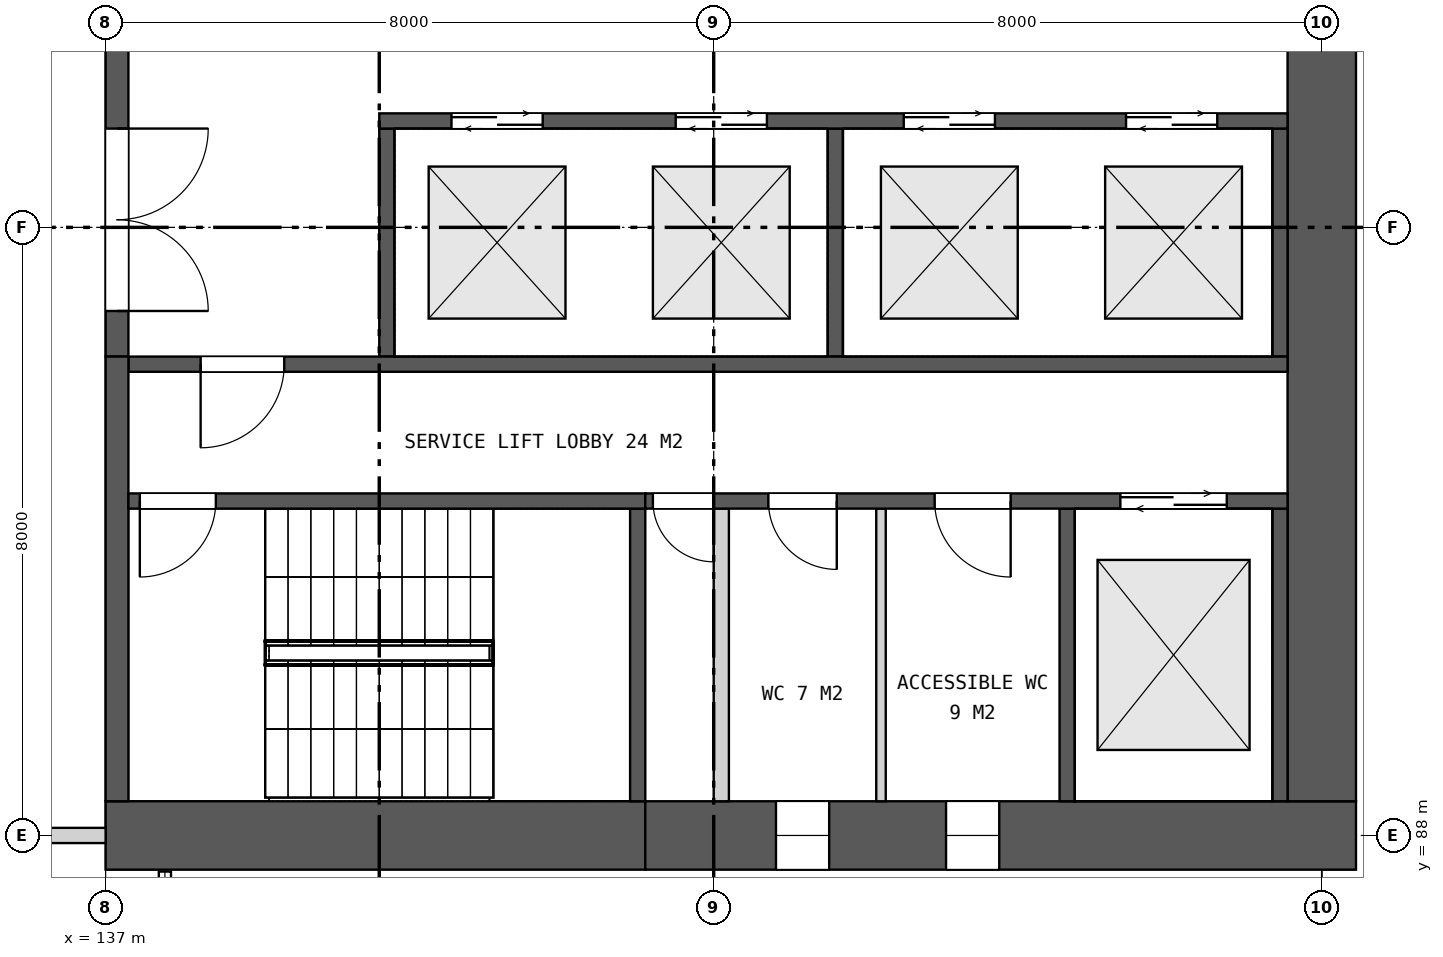
"""IFC4 building model, lengths in metres.
Left out: names, types, materials, properties, quantities, classifications, styles, units other than length and angle.
Written with IfcOpenShell. Run it as: python <this file> out.ifc"""

import sys

from ifc_helpers import new_model, si_unit, direction, frame, frame_2d, origin, place, context, subcontext, project, spatial, rectangle, extrude, element, fill, save


model = new_model("IFC4")
c1 = context("Model", 3, precision=1e-05, world=origin(), true_north=direction((0.0, 1.0)))
c2 = subcontext(c1, "Body", "Model", "MODEL_VIEW")
j1 = project(units=[si_unit("LENGTHUNIT", "METRE"), si_unit("PLANEANGLEUNIT", "RADIAN")], contexts=[c1])
p1 = place(None, origin())
s1 = spatial("IfcSite", under=j1, at=p1, CompositionType="ELEMENT")
p2 = place(p1, origin())
s2 = spatial("IfcBuilding", under=s1, at=p2, CompositionType="ELEMENT")
p3 = place(p2, frame((0.0, 0.0, 34.0)))
s3 = spatial("IfcBuildingStorey", under=s2, at=p3, CompositionType="ELEMENT", Elevation=34.0)
p4 = place(p3, frame((137.0, 88.0, 0.0), z_axis=(0.0, 0.0, 1.0), x_axis=(1.0, 0.0, 0.0)))
e1 = element("IfcWall", 1, at=p4, inside=s3, PredefinedType="SHEAR", context=c2, shape_type="SweptSolid", body=[
    extrude(rectangle(XDim=7.1, YDim=0.9, at=frame_2d((3.55, 0.0))), origin(), (0.0, 0.0, 1.0), 7.5),
])
p5 = place(p3, frame((144.1, 88.0, 0.0), z_axis=(0.0, 0.0, 1.0), x_axis=(1.0, 0.0, 0.0)))
e2 = element("IfcWall", 2, at=p5, inside=s3, PredefinedType="SHEAR", context=c2, shape_type="SweptSolid", body=[
    extrude(rectangle(XDim=9.35, YDim=0.9, at=frame_2d((4.675, 0.0))), origin(), (0.0, 0.0, 1.0), 7.5),
])
p6 = place(p5, frame((1.719, 0.0, 1.5)))
e3 = element("IfcOpeningElement", 3, at=p6, cuts=e2, PredefinedType="OPENING", context=c2, shape_type="SweptSolid", body=[
    extrude(rectangle(XDim=0.7, YDim=0.9, at=frame_2d((0.35, 0.45))), frame((0.0, 0.46, 0.0), z_axis=(0.0, -1.0, 0.0), x_axis=(1.0, 0.0, 0.0)), (0.0, 0.0, 1.0), 0.92),
])
p7 = place(p5, frame((3.957, 0.0, 1.5)))
e4 = element("IfcOpeningElement", 4, at=p7, cuts=e2, PredefinedType="OPENING", context=c2, shape_type="SweptSolid", body=[
    extrude(rectangle(XDim=0.7, YDim=0.9, at=frame_2d((0.35, 0.45))), frame((0.0, 0.46, 0.0), z_axis=(0.0, -1.0, 0.0), x_axis=(1.0, 0.0, 0.0)), (0.0, 0.0, 1.0), 0.92),
])
p8 = place(p3, frame((153.0, 88.45, 0.0), z_axis=(0.0, 0.0, 1.0), x_axis=(0.0, 1.0, 0.0)))
e5 = element("IfcWall", 5, at=p8, inside=s3, PredefinedType="SHEAR", context=c2, shape_type="SweptSolid", body=[
    extrude(rectangle(XDim=23.1, YDim=0.9, at=frame_2d((11.55, 0.0))), origin(), (0.0, 0.0, 1.0), 7.5),
])
p9 = place(p8, frame((10.35, 0.0, 0.0)))
e6 = element("IfcOpeningElement", 6, at=p9, cuts=e5, PredefinedType="OPENING", context=c2, shape_type="SweptSolid", body=[
    extrude(rectangle(XDim=2.4, YDim=2.4, at=frame_2d((1.2, 1.2))), frame((0.0, 0.46, 0.0), z_axis=(0.0, -1.0, 0.0), x_axis=(1.0, 0.0, 0.0)), (0.0, 0.0, 1.0), 0.92),
])
p10 = place(p3, frame((137.15, 94.3, 0.0), z_axis=(0.0, 0.0, 1.0), x_axis=(0.0, 1.0, 0.0)))
e7 = element("IfcWall", 7, at=p10, inside=s3, PredefinedType="SHEAR", context=c2, shape_type="SweptSolid", body=[
    extrude(rectangle(XDim=11.4, YDim=0.3, at=frame_2d((5.7, 0.0))), origin(), (0.0, 0.0, 1.0), 7.5),
])
p11 = place(p10, frame((0.6, 0.0, 0.0)))
e8 = element("IfcOpeningElement", 8, at=p11, cuts=e7, PredefinedType="OPENING", context=c2, shape_type="SweptSolid", body=[
    extrude(rectangle(XDim=2.4, YDim=2.4, at=frame_2d((1.2, 1.2))), frame((0.0, 0.16, 0.0), z_axis=(0.0, -1.0, 0.0), x_axis=(1.0, 0.0, 0.0)), (0.0, 0.0, 1.0), 0.32),
])
p12 = place(p10, frame((4.5, 0.0, 0.0)))
e9 = element("IfcOpeningElement", 9, at=p12, cuts=e7, PredefinedType="OPENING", context=c2, shape_type="SweptSolid", body=[
    extrude(rectangle(XDim=2.4, YDim=2.4, at=frame_2d((1.2, 1.2))), frame((0.0, 0.16, 0.0), z_axis=(0.0, -1.0, 0.0), x_axis=(1.0, 0.0, 0.0)), (0.0, 0.0, 1.0), 0.32),
])
p13 = place(p10, frame((8.4, 0.0, 0.0)))
e10 = element("IfcOpeningElement", 10, at=p13, cuts=e7, PredefinedType="OPENING", context=c2, shape_type="SweptSolid", body=[
    extrude(rectangle(XDim=2.4, YDim=2.4, at=frame_2d((1.2, 1.2))), frame((0.0, 0.16, 0.0), z_axis=(0.0, -1.0, 0.0), x_axis=(1.0, 0.0, 0.0)), (0.0, 0.0, 1.0), 0.32),
])
for number, where, z_axis, x_axis in (
    (11, (140.7, 94.3, 0.0), (0.0, 0.0, 1.0), (0.0, 1.0, 0.0)),
    (12, (146.6, 94.3, 0.0), (0.0, 0.0, 1.0), (0.0, 1.0, 0.0)),
    (13, (152.45, 94.3, 0.0), (0.0, 0.0, 1.0), (0.0, 1.0, 0.0)),
):
    element("IfcWall", number, at=place(p3, frame(where, z_axis=z_axis, x_axis=x_axis)), inside=s3, PredefinedType="SHEAR", context=c2, shape_type="SweptSolid", body=[
        extrude(rectangle(XDim=3.0, YDim=0.2, at=frame_2d((1.5, 0.0))), origin(), (0.0, 0.0, 1.0), 7.5),
    ])
p14 = place(p3, frame((140.6, 97.4, 0.0), z_axis=(0.0, 0.0, 1.0), x_axis=(1.0, 0.0, 0.0)))
e14 = element("IfcWall", 14, at=p14, inside=s3, PredefinedType="SHEAR", context=c2, shape_type="SweptSolid", body=[
    extrude(rectangle(XDim=11.95, YDim=0.2, at=frame_2d((5.975, 0.0))), origin(), (0.0, 0.0, 1.0), 7.5),
])
p15 = place(p14, frame((0.95, 0.0, 0.0)))
e15 = element("IfcOpeningElement", 15, at=p15, cuts=e14, PredefinedType="OPENING", context=c2, shape_type="SweptSolid", body=[
    extrude(rectangle(XDim=1.2, YDim=2.1, at=frame_2d((0.6, 1.05))), frame((0.0, 0.11, 0.0), z_axis=(0.0, -1.0, 0.0), x_axis=(1.0, 0.0, 0.0)), (0.0, 0.0, 1.0), 0.22),
])
p16 = place(p14, frame((3.9, 0.0, 0.0)))
e16 = element("IfcOpeningElement", 16, at=p16, cuts=e14, PredefinedType="OPENING", context=c2, shape_type="SweptSolid", body=[
    extrude(rectangle(XDim=1.2, YDim=2.1, at=frame_2d((0.6, 1.05))), frame((0.0, 0.11, 0.0), z_axis=(0.0, -1.0, 0.0), x_axis=(1.0, 0.0, 0.0)), (0.0, 0.0, 1.0), 0.22),
])
p17 = place(p14, frame((6.9, 0.0, 0.0)))
e17 = element("IfcOpeningElement", 17, at=p17, cuts=e14, PredefinedType="OPENING", context=c2, shape_type="SweptSolid", body=[
    extrude(rectangle(XDim=1.2, YDim=2.1, at=frame_2d((0.6, 1.05))), frame((0.0, 0.11, 0.0), z_axis=(0.0, -1.0, 0.0), x_axis=(1.0, 0.0, 0.0)), (0.0, 0.0, 1.0), 0.22),
])
p18 = place(p14, frame((9.825, 0.0, 0.0)))
e18 = element("IfcOpeningElement", 18, at=p18, cuts=e14, PredefinedType="OPENING", context=c2, shape_type="SweptSolid", body=[
    extrude(rectangle(XDim=1.2, YDim=2.1, at=frame_2d((0.6, 1.05))), frame((0.0, 0.11, 0.0), z_axis=(0.0, -1.0, 0.0), x_axis=(1.0, 0.0, 0.0)), (0.0, 0.0, 1.0), 0.22),
])
p19 = place(p3, frame((137.3, 94.2, 0.0), z_axis=(0.0, 0.0, 1.0), x_axis=(1.0, 0.0, 0.0)))
e19 = element("IfcWall", 19, at=p19, inside=s3, PredefinedType="SHEAR", context=c2, shape_type="SweptSolid", body=[
    extrude(rectangle(XDim=15.25, YDim=0.2, at=frame_2d((7.625, 0.0))), origin(), (0.0, 0.0, 1.0), 7.5),
])
p20 = place(p19, frame((0.95, 0.0, 0.0)))
e20 = element("IfcOpeningElement", 20, at=p20, cuts=e19, PredefinedType="OPENING", context=c2, shape_type="SweptSolid", body=[
    extrude(rectangle(XDim=1.1, YDim=2.1, at=frame_2d((0.55, 1.05))), frame((0.0, 0.11, 0.0), z_axis=(0.0, -1.0, 0.0), x_axis=(1.0, 0.0, 0.0)), (0.0, 0.0, 1.0), 0.22),
])
p21 = place(p3, frame((137.15, 88.45, 0.0), z_axis=(0.0, 0.0, 1.0), x_axis=(0.0, 1.0, 0.0)))
e21 = element("IfcWall", 21, at=p21, inside=s3, PredefinedType="SHEAR", context=c2, shape_type="SweptSolid", body=[
    extrude(rectangle(XDim=5.85, YDim=0.3, at=frame_2d((2.925, 0.0))), origin(), (0.0, 0.0, 1.0), 7.5),
])
for number, where, z_axis, x_axis in (
    (22, (144.0, 88.45, 0.0), (0.0, 0.0, 1.0), (0.0, 1.0, 0.0)),
    (23, (149.65, 88.45, 0.0), (0.0, 0.0, 1.0), (0.0, 1.0, 0.0)),
    (24, (152.45, 88.45, 0.0), (0.0, 0.0, 1.0), (0.0, 1.0, 0.0)),
):
    element("IfcWall", number, at=place(p3, frame(where, z_axis=z_axis, x_axis=x_axis)), inside=s3, PredefinedType="SHEAR", context=c2, shape_type="SweptSolid", body=[
        extrude(rectangle(XDim=3.85, YDim=0.2, at=frame_2d((1.925, 0.0))), origin(), (0.0, 0.0, 1.0), 7.5),
    ])
p22 = place(p3, frame((145.1, 88.45, 0.0), z_axis=(0.0, 0.0, 1.0), x_axis=(0.0, 1.0, 0.0)))
e25 = element("IfcWall", 25, at=p22, inside=s3, PredefinedType="PARTITIONING", context=c2, shape_type="SweptSolid", body=[
    extrude(rectangle(XDim=3.85, YDim=0.2, at=frame_2d((1.925, 0.0))), origin(), (0.0, 0.0, 1.0), 7.5),
])
p23 = place(p3, frame((147.201, 88.45, 0.0), z_axis=(0.0, 0.0, 1.0), x_axis=(0.0, 1.0, 0.0)))
e26 = element("IfcWall", 26, at=p23, inside=s3, PredefinedType="PARTITIONING", context=c2, shape_type="SweptSolid", body=[
    extrude(rectangle(XDim=3.85, YDim=0.125, at=frame_2d((1.925, 0.0))), origin(), (0.0, 0.0, 1.0), 7.5),
])
p24 = place(p3, frame((137.3, 92.4, 0.0), z_axis=(0.0, 0.0, 1.0), x_axis=(1.0, 0.0, 0.0)))
e27 = element("IfcWall", 27, at=p24, inside=s3, PredefinedType="SHEAR", context=c2, shape_type="SweptSolid", body=[
    extrude(rectangle(XDim=6.8, YDim=0.2, at=frame_2d((3.4, 0.0))), origin(), (0.0, 0.0, 1.0), 7.5),
])
p25 = place(p24, frame((0.15, 0.0, 0.0)))
e28 = element("IfcOpeningElement", 28, at=p25, cuts=e27, PredefinedType="OPENING", context=c2, shape_type="SweptSolid", body=[
    extrude(rectangle(XDim=1.0, YDim=2.1, at=frame_2d((0.5, 1.05))), frame((0.0, 0.11, 0.0), z_axis=(0.0, -1.0, 0.0), x_axis=(1.0, 0.0, 0.0)), (0.0, 0.0, 1.0), 0.22),
])
p26 = place(p3, frame((144.1, 92.4, 0.0), z_axis=(0.0, 0.0, 1.0), x_axis=(1.0, 0.0, 0.0)))
e29 = element("IfcWall", 29, at=p26, inside=s3, PredefinedType="SHEAR", context=c2, shape_type="SweptSolid", body=[
    extrude(rectangle(XDim=8.45, YDim=0.2, at=frame_2d((4.225, 0.0))), origin(), (0.0, 0.0, 1.0), 7.5),
])
p27 = place(p26, frame((0.1, 0.0, 0.0)))
e30 = element("IfcOpeningElement", 30, at=p27, cuts=e29, PredefinedType="OPENING", context=c2, shape_type="SweptSolid", body=[
    extrude(rectangle(XDim=0.8, YDim=2.1, at=frame_2d((0.4, 1.05))), frame((0.0, 0.11, 0.0), z_axis=(0.0, -1.0, 0.0), x_axis=(1.0, 0.0, 0.0)), (0.0, 0.0, 1.0), 0.22),
])
p28 = place(p26, frame((1.619, 0.0, 0.0)))
e31 = element("IfcOpeningElement", 31, at=p28, cuts=e29, PredefinedType="OPENING", context=c2, shape_type="SweptSolid", body=[
    extrude(rectangle(XDim=0.9, YDim=2.1, at=frame_2d((0.45, 1.05))), frame((0.0, 0.11, 0.0), z_axis=(0.0, -1.0, 0.0), x_axis=(1.0, 0.0, 0.0)), (0.0, 0.0, 1.0), 0.22),
])
p29 = place(p26, frame((3.807, 0.0, 0.0)))
e32 = element("IfcOpeningElement", 32, at=p29, cuts=e29, PredefinedType="OPENING", context=c2, shape_type="SweptSolid", body=[
    extrude(rectangle(XDim=1.0, YDim=2.1, at=frame_2d((0.5, 1.05))), frame((0.0, 0.11, 0.0), z_axis=(0.0, -1.0, 0.0), x_axis=(1.0, 0.0, 0.0)), (0.0, 0.0, 1.0), 0.22),
])
p30 = place(p26, frame((6.25, 0.0, 0.0)))
e33 = element("IfcOpeningElement", 33, at=p30, cuts=e29, PredefinedType="OPENING", context=c2, shape_type="SweptSolid", body=[
    extrude(rectangle(XDim=1.4, YDim=2.1, at=frame_2d((0.7, 1.05))), frame((0.0, 0.11, 0.0), z_axis=(0.0, -1.0, 0.0), x_axis=(1.0, 0.0, 0.0)), (0.0, 0.0, 1.0), 0.22),
])
p31 = place(p3, frame((129.6, 88.0, 0.0), z_axis=(0.0, 0.0, 1.0), x_axis=(1.0, 0.0, 0.0)))
e34 = element("IfcWall", 34, at=p31, inside=s3, PredefinedType="PARTITIONING", context=c2, shape_type="SweptSolid", body=[
    extrude(rectangle(XDim=7.4, YDim=0.2, at=frame_2d((3.7, 0.0))), origin(), (0.0, 0.0, 1.0), 6.551),
])
p32 = place(p31, frame((2.2, 0.0, 0.0)))
e35 = element("IfcOpeningElement", 35, at=p32, cuts=e34, PredefinedType="OPENING", context=c2, shape_type="SweptSolid", body=[
    extrude(rectangle(XDim=2.4, YDim=2.4, at=frame_2d((1.2, 1.2))), frame((0.0, 0.11, 0.0), z_axis=(0.0, -1.0, 0.0), x_axis=(1.0, 0.0, 0.0)), (0.0, 0.0, 1.0), 0.22),
])
p33 = place(p6, origin())
e36 = element("IfcWindow", 36, at=p33, inside=s3, PartitioningType="SINGLE_PANEL", PredefinedType="WINDOW", context=c2, shape_type="SweptSolid", body=[
    extrude(rectangle(XDim=0.7, YDim=0.9, at=frame_2d((0.35, 0.45))), frame((0.0, 0.03, 0.0), z_axis=(0.0, -1.0, 0.0), x_axis=(1.0, 0.0, 0.0)), (0.0, 0.0, 1.0), 0.06),
])
fill(e3, e36)
p34 = place(p7, origin())
e37 = element("IfcWindow", 37, at=p34, inside=s3, PartitioningType="SINGLE_PANEL", PredefinedType="WINDOW", context=c2, shape_type="SweptSolid", body=[
    extrude(rectangle(XDim=0.7, YDim=0.9, at=frame_2d((0.35, 0.45))), frame((0.0, 0.03, 0.0), z_axis=(0.0, -1.0, 0.0), x_axis=(1.0, 0.0, 0.0)), (0.0, 0.0, 1.0), 0.06),
])
fill(e4, e37)
p35 = place(p11, frame((2.4, 0.0, 0.0), z_axis=(0.0, 0.0, 1.0), x_axis=(-1.0, 0.0, 0.0)))
e38 = element("IfcDoor", 38, at=p35, inside=s3, OperationType="DOUBLE_DOOR_SINGLE_SWING", PredefinedType="DOOR", context=c2, shape_type="SweptSolid", body=[
    extrude(rectangle(XDim=2.4, YDim=2.4, at=frame_2d((1.2, 1.2))), frame((0.0, 0.025, 0.0), z_axis=(0.0, -1.0, 0.0), x_axis=(1.0, 0.0, 0.0)), (0.0, 0.0, 1.0), 0.05),
])
fill(e8, e38)
p36 = place(p15, origin())
e39 = element("IfcDoor", 39, at=p36, inside=s3, OperationType="DOUBLE_DOOR_SLIDING", PredefinedType="DOOR", context=c2, shape_type="SweptSolid", body=[
    extrude(rectangle(XDim=1.2, YDim=2.1, at=frame_2d((0.6, 1.05))), frame((0.0, 0.025, 0.0), z_axis=(0.0, -1.0, 0.0), x_axis=(1.0, 0.0, 0.0)), (0.0, 0.0, 1.0), 0.05),
])
fill(e15, e39)
p37 = place(p16, origin())
e40 = element("IfcDoor", 40, at=p37, inside=s3, OperationType="DOUBLE_DOOR_SLIDING", PredefinedType="DOOR", context=c2, shape_type="SweptSolid", body=[
    extrude(rectangle(XDim=1.2, YDim=2.1, at=frame_2d((0.6, 1.05))), frame((0.0, 0.025, 0.0), z_axis=(0.0, -1.0, 0.0), x_axis=(1.0, 0.0, 0.0)), (0.0, 0.0, 1.0), 0.05),
])
fill(e16, e40)
p38 = place(p17, origin())
e41 = element("IfcDoor", 41, at=p38, inside=s3, OperationType="DOUBLE_DOOR_SLIDING", PredefinedType="DOOR", context=c2, shape_type="SweptSolid", body=[
    extrude(rectangle(XDim=1.2, YDim=2.1, at=frame_2d((0.6, 1.05))), frame((0.0, 0.025, 0.0), z_axis=(0.0, -1.0, 0.0), x_axis=(1.0, 0.0, 0.0)), (0.0, 0.0, 1.0), 0.05),
])
fill(e17, e41)
p39 = place(p18, origin())
e42 = element("IfcDoor", 42, at=p39, inside=s3, OperationType="DOUBLE_DOOR_SLIDING", PredefinedType="DOOR", context=c2, shape_type="SweptSolid", body=[
    extrude(rectangle(XDim=1.2, YDim=2.1, at=frame_2d((0.6, 1.05))), frame((0.0, 0.025, 0.0), z_axis=(0.0, -1.0, 0.0), x_axis=(1.0, 0.0, 0.0)), (0.0, 0.0, 1.0), 0.05),
])
fill(e18, e42)
p40 = place(p20, frame((1.1, 0.0, 0.0), z_axis=(0.0, 0.0, 1.0), x_axis=(-1.0, 0.0, 0.0)))
e43 = element("IfcDoor", 43, at=p40, inside=s3, OperationType="SINGLE_SWING_RIGHT", PredefinedType="DOOR", context=c2, shape_type="SweptSolid", body=[
    extrude(rectangle(XDim=1.1, YDim=2.1, at=frame_2d((0.55, 1.05))), frame((0.0, 0.025, 0.0), z_axis=(0.0, -1.0, 0.0), x_axis=(1.0, 0.0, 0.0)), (0.0, 0.0, 1.0), 0.05),
])
fill(e20, e43)
p41 = place(p25, frame((1.0, 0.0, 0.0), z_axis=(0.0, 0.0, 1.0), x_axis=(-1.0, 0.0, 0.0)))
e44 = element("IfcDoor", 44, at=p41, inside=s3, OperationType="SINGLE_SWING_RIGHT", PredefinedType="DOOR", context=c2, shape_type="SweptSolid", body=[
    extrude(rectangle(XDim=1.0, YDim=2.1, at=frame_2d((0.5, 1.05))), frame((0.0, 0.025, 0.0), z_axis=(0.0, -1.0, 0.0), x_axis=(1.0, 0.0, 0.0)), (0.0, 0.0, 1.0), 0.05),
])
fill(e28, e44)
p42 = place(p27, frame((0.8, 0.0, 0.0), z_axis=(0.0, 0.0, 1.0), x_axis=(-1.0, 0.0, 0.0)))
e45 = element("IfcDoor", 45, at=p42, inside=s3, OperationType="SINGLE_SWING_LEFT", PredefinedType="DOOR", context=c2, shape_type="SweptSolid", body=[
    extrude(rectangle(XDim=0.8, YDim=2.1, at=frame_2d((0.4, 1.05))), frame((0.0, 0.025, 0.0), z_axis=(0.0, -1.0, 0.0), x_axis=(1.0, 0.0, 0.0)), (0.0, 0.0, 1.0), 0.05),
])
fill(e30, e45)
p43 = place(p28, frame((0.9, 0.0, 0.0), z_axis=(0.0, 0.0, 1.0), x_axis=(-1.0, 0.0, 0.0)))
e46 = element("IfcDoor", 46, at=p43, inside=s3, OperationType="SINGLE_SWING_LEFT", PredefinedType="DOOR", context=c2, shape_type="SweptSolid", body=[
    extrude(rectangle(XDim=0.9, YDim=2.1, at=frame_2d((0.45, 1.05))), frame((0.0, 0.025, 0.0), z_axis=(0.0, -1.0, 0.0), x_axis=(1.0, 0.0, 0.0)), (0.0, 0.0, 1.0), 0.05),
])
fill(e31, e46)
p44 = place(p29, frame((1.0, 0.0, 0.0), z_axis=(0.0, 0.0, 1.0), x_axis=(-1.0, 0.0, 0.0)))
e47 = element("IfcDoor", 47, at=p44, inside=s3, OperationType="SINGLE_SWING_LEFT", PredefinedType="DOOR", context=c2, shape_type="SweptSolid", body=[
    extrude(rectangle(XDim=1.0, YDim=2.1, at=frame_2d((0.5, 1.05))), frame((0.0, 0.025, 0.0), z_axis=(0.0, -1.0, 0.0), x_axis=(1.0, 0.0, 0.0)), (0.0, 0.0, 1.0), 0.05),
])
fill(e32, e47)
p45 = place(p30, origin())
e48 = element("IfcDoor", 48, at=p45, inside=s3, OperationType="DOUBLE_DOOR_SLIDING", PredefinedType="DOOR", context=c2, shape_type="SweptSolid", body=[
    extrude(rectangle(XDim=1.4, YDim=2.1, at=frame_2d((0.7, 1.05))), frame((0.0, 0.025, 0.0), z_axis=(0.0, -1.0, 0.0), x_axis=(1.0, 0.0, 0.0)), (0.0, 0.0, 1.0), 0.05),
])
fill(e33, e48)
save(model, sys.argv[1])
